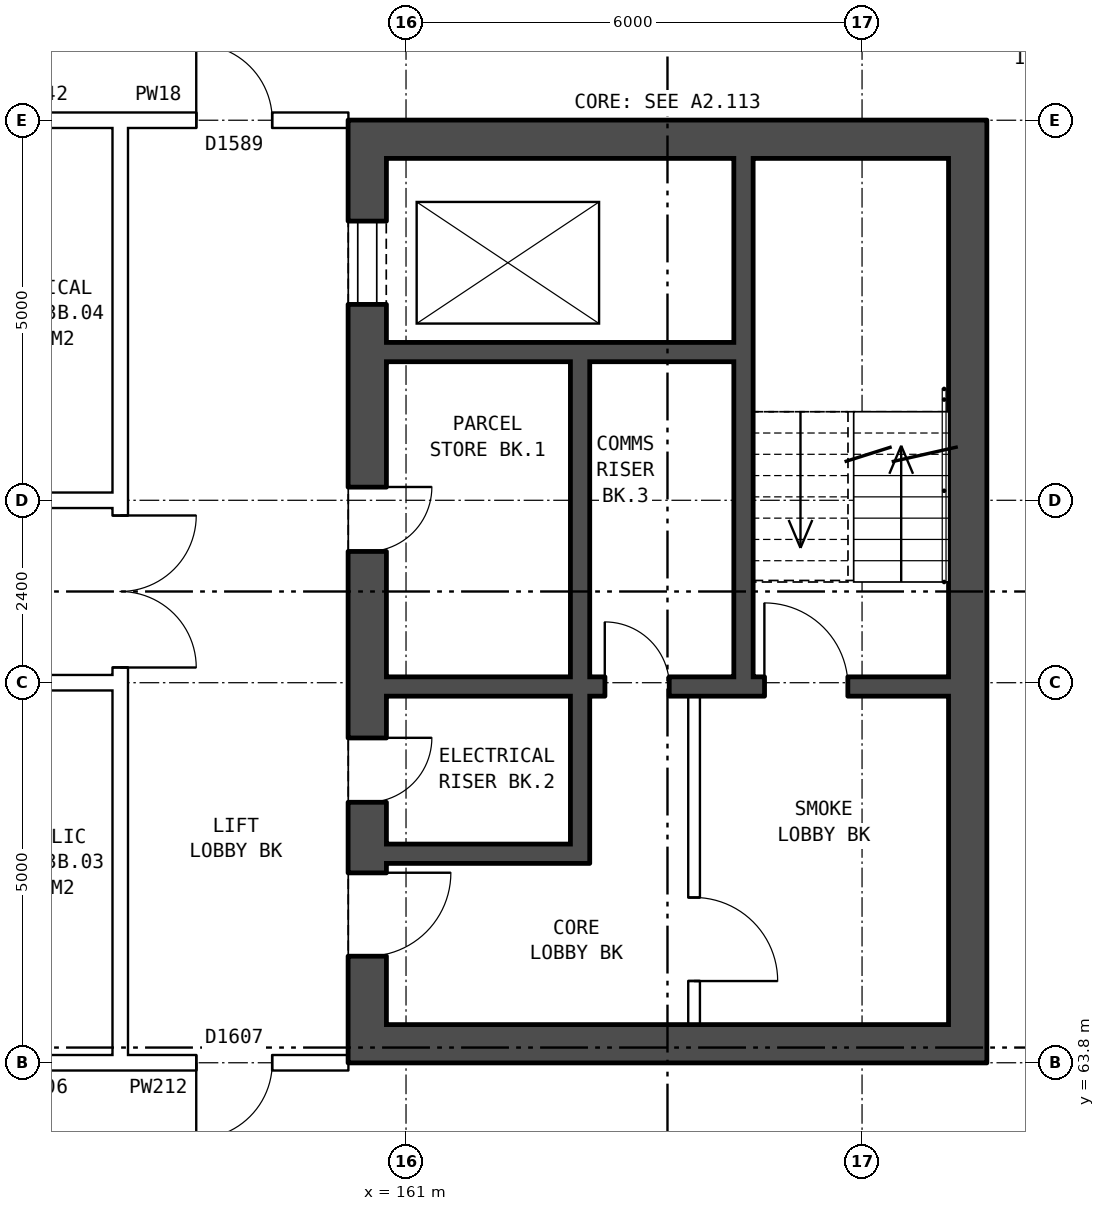
"""IFC4 building model, lengths in metres.
Left out: names, types, materials, properties, quantities, classifications, styles, units other than length and angle.
Written with IfcOpenShell. Run it as: python <this file> out.ifc"""

import sys

from ifc_helpers import new_model, si_unit, direction, frame, frame_2d, origin, place, context, subcontext, project, spatial, rectangle, extrude, element, fill, save


model = new_model("IFC4")
c1 = context("Model", 3, precision=1e-05, world=origin(), true_north=direction((0.0, 1.0)))
c2 = subcontext(c1, "Body", "Model", "MODEL_VIEW")
j1 = project(units=[si_unit("LENGTHUNIT", "METRE"), si_unit("PLANEANGLEUNIT", "RADIAN")], contexts=[c1])
p1 = place(None, origin())
s1 = spatial("IfcSite", under=j1, at=p1, CompositionType="ELEMENT")
p2 = place(p1, origin())
s2 = spatial("IfcBuilding", under=s1, at=p2, CompositionType="ELEMENT")
p3 = place(p2, frame((0.0, 0.0, 154.7)))
s3 = spatial("IfcBuildingStorey", under=s2, at=p3, CompositionType="ELEMENT", Elevation=154.7)
p4 = place(p3, frame((160.49, 76.2, 0.0), z_axis=(0.0, 0.0, 1.0), x_axis=(0.0, -1.0, 0.0)))
e1 = element("IfcWall", 1, at=p4, inside=s3, PredefinedType="SHEAR", context=c2, shape_type="SweptSolid", body=[
    extrude(rectangle(XDim=12.4, YDim=0.5, at=frame_2d((6.2, 0.0))), origin(), (0.0, 0.0, 1.0), 2.85),
])
p5 = place(p4, frame((1.325, 0.0, 0.0)))
e2 = element("IfcOpeningElement", 2, at=p5, cuts=e1, PredefinedType="OPENING", context=c2, shape_type="SweptSolid", body=[
    extrude(rectangle(XDim=1.1, YDim=2.1, at=frame_2d((0.55, 1.05))), frame((0.0, 0.26, 0.0), z_axis=(0.0, -1.0, 0.0), x_axis=(1.0, 0.0, 0.0)), (0.0, 0.0, 1.0), 0.52),
])
p6 = place(p4, frame((4.825, 0.0, 0.0)))
e3 = element("IfcOpeningElement", 3, at=p6, cuts=e1, PredefinedType="OPENING", context=c2, shape_type="SweptSolid", body=[
    extrude(rectangle(XDim=0.85, YDim=2.1, at=frame_2d((0.425, 1.05))), frame((0.0, 0.26, 0.0), z_axis=(0.0, -1.0, 0.0), x_axis=(1.0, 0.0, 0.0)), (0.0, 0.0, 1.0), 0.52),
])
p7 = place(p4, frame((9.9, 0.0, 0.0)))
e4 = element("IfcOpeningElement", 4, at=p7, cuts=e1, PredefinedType="OPENING", context=c2, shape_type="SweptSolid", body=[
    extrude(rectangle(XDim=1.1, YDim=2.1, at=frame_2d((0.55, 1.05))), frame((0.0, 0.26, 0.0), z_axis=(0.0, -1.0, 0.0), x_axis=(1.0, 0.0, 0.0)), (0.0, 0.0, 1.0), 0.52),
])
p8 = place(p4, frame((8.125, 0.0, 0.0)))
e5 = element("IfcOpeningElement", 5, at=p8, cuts=e1, PredefinedType="OPENING", context=c2, shape_type="SweptSolid", body=[
    extrude(rectangle(XDim=0.85, YDim=2.1, at=frame_2d((0.425, 1.05))), frame((0.0, 0.26, 0.0), z_axis=(0.0, -1.0, 0.0), x_axis=(1.0, 0.0, 0.0)), (0.0, 0.0, 1.0), 0.52),
])
p9 = place(p3, frame((168.39, 76.2, 0.0), z_axis=(0.0, 0.0, 1.0), x_axis=(0.0, -1.0, 0.0)))
e6 = element("IfcWall", 6, at=p9, inside=s3, PredefinedType="SHEAR", context=c2, shape_type="SweptSolid", body=[
    extrude(rectangle(XDim=12.4, YDim=0.5, at=frame_2d((6.2, 0.0))), origin(), (0.0, 0.0, 1.0), 2.85),
])
for number, where, z_axis, x_axis in (
    (7, (160.74, 75.95, 0.0), (0.0, 0.0, 1.0), (1.0, 0.0, 0.0)),
    (8, (160.74, 64.05, 0.0), (0.0, 0.0, 1.0), (1.0, 0.0, 0.0)),
):
    element("IfcWall", number, at=place(p3, frame(where, z_axis=z_axis, x_axis=x_axis)), inside=s3, PredefinedType="SHEAR", context=c2, shape_type="SweptSolid", body=[
        extrude(rectangle(XDim=7.4, YDim=0.5, at=frame_2d((3.7, 0.0))), origin(), (0.0, 0.0, 1.0), 2.85),
    ])
p10 = place(p3, frame((160.74, 73.15, 0.0), z_axis=(0.0, 0.0, 1.0), x_axis=(1.0, 0.0, 0.0)))
e9 = element("IfcWall", 9, at=p10, inside=s3, PredefinedType="SHEAR", context=c2, shape_type="SweptSolid", body=[
    extrude(rectangle(XDim=4.575, YDim=0.25, at=frame_2d((2.288, 0.0))), origin(), (0.0, 0.0, 1.0), 2.85),
])
p11 = place(p3, frame((160.74, 68.75, 0.0), z_axis=(0.0, 0.0, 1.0), x_axis=(1.0, 0.0, 0.0)))
e10 = element("IfcWall", 10, at=p11, inside=s3, PredefinedType="SHEAR", context=c2, shape_type="SweptSolid", body=[
    extrude(rectangle(XDim=7.4, YDim=0.25, at=frame_2d((3.7, 0.0))), origin(), (0.0, 0.0, 1.0), 2.85),
])
p12 = place(p11, frame((4.975, 0.0, 0.0)))
e11 = element("IfcOpeningElement", 11, at=p12, cuts=e10, PredefinedType="OPENING", context=c2, shape_type="SweptSolid", body=[
    extrude(rectangle(XDim=1.1, YDim=2.1, at=frame_2d((0.55, 1.05))), frame((0.0, 0.135, 0.0), z_axis=(0.0, -1.0, 0.0), x_axis=(1.0, 0.0, 0.0)), (0.0, 0.0, 1.0), 0.27),
])
p13 = place(p11, frame((2.875, 0.0, 0.0)))
e12 = element("IfcOpeningElement", 12, at=p13, cuts=e10, PredefinedType="OPENING", context=c2, shape_type="SweptSolid", body=[
    extrude(rectangle(XDim=0.85, YDim=2.1, at=frame_2d((0.425, 1.05))), frame((0.0, 0.135, 0.0), z_axis=(0.0, -1.0, 0.0), x_axis=(1.0, 0.0, 0.0)), (0.0, 0.0, 1.0), 0.27),
])
p14 = place(p3, frame((160.74, 66.55, 0.0), z_axis=(0.0, 0.0, 1.0), x_axis=(1.0, 0.0, 0.0)))
e13 = element("IfcWall", 13, at=p14, inside=s3, PredefinedType="SHEAR", context=c2, shape_type="SweptSolid", body=[
    extrude(rectangle(XDim=2.425, YDim=0.25, at=frame_2d((1.212, 0.0))), origin(), (0.0, 0.0, 1.0), 2.85),
])
p15 = place(p3, frame((163.29, 73.025, 0.0), z_axis=(0.0, 0.0, 1.0), x_axis=(0.0, -1.0, 0.0)))
e14 = element("IfcWall", 14, at=p15, inside=s3, PredefinedType="SHEAR", context=c2, shape_type="SweptSolid", body=[
    extrude(rectangle(XDim=4.15, YDim=0.25, at=frame_2d((2.075, 0.0))), origin(), (0.0, 0.0, 1.0), 2.85),
])
p16 = place(p3, frame((163.29, 68.625, 0.0), z_axis=(0.0, 0.0, 1.0), x_axis=(0.0, -1.0, 0.0)))
e15 = element("IfcWall", 15, at=p16, inside=s3, PredefinedType="SHEAR", context=c2, shape_type="SweptSolid", body=[
    extrude(rectangle(XDim=2.2, YDim=0.25, at=frame_2d((1.1, 0.0))), origin(), (0.0, 0.0, 1.0), 2.85),
])
p17 = place(p3, frame((164.79, 68.625, 0.0), z_axis=(0.0, 0.0, 1.0), x_axis=(0.0, -1.0, 0.0)))
e16 = element("IfcWall", 16, at=p17, inside=s3, PredefinedType="PARTITIONING", context=c2, shape_type="SweptSolid", body=[
    extrude(rectangle(XDim=4.325, YDim=0.15, at=frame_2d((2.163, 0.0))), origin(), (0.0, 0.0, 1.0), 2.85),
])
p18 = place(p17, frame((2.65, 0.0, 0.0)))
e17 = element("IfcOpeningElement", 17, at=p18, cuts=e16, PredefinedType="OPENING", context=c2, shape_type="SweptSolid", body=[
    extrude(rectangle(XDim=1.1, YDim=2.1, at=frame_2d((0.55, 1.05))), frame((0.0, 0.085, 0.0), z_axis=(0.0, -1.0, 0.0), x_axis=(1.0, 0.0, 0.0)), (0.0, 0.0, 1.0), 0.17),
])
p19 = place(p3, frame((165.44, 75.7, 0.0), z_axis=(0.0, 0.0, 1.0), x_axis=(0.0, -1.0, 0.0)))
e18 = element("IfcWall", 18, at=p19, inside=s3, PredefinedType="SHEAR", context=c2, shape_type="SweptSolid", body=[
    extrude(rectangle(XDim=6.825, YDim=0.25, at=frame_2d((3.413, 0.0))), origin(), (0.0, 0.0, 1.0), 2.85),
])
p20 = place(p3, frame((157.24, 63.9, 0.0), z_axis=(0.0, 0.0, 1.0), x_axis=(0.0, 1.0, 0.0)))
e19 = element("IfcWall", 19, at=p20, inside=s3, PredefinedType="PARTITIONING", context=c2, shape_type="SweptSolid", body=[
    extrude(rectangle(XDim=12.2, YDim=0.2, at=frame_2d((6.1, 0.0))), origin(), (0.0, 0.0, 1.0), 2.85),
])
p21 = place(p20, frame((5.1, 0.0, 0.0)))
e20 = element("IfcOpeningElement", 20, at=p21, cuts=e19, PredefinedType="OPENING", context=c2, shape_type="SweptSolid", body=[
    extrude(rectangle(XDim=2.0, YDim=2.1, at=frame_2d((1.0, 1.05))), frame((0.0, 0.11, 0.0), z_axis=(0.0, -1.0, 0.0), x_axis=(1.0, 0.0, 0.0)), (0.0, 0.0, 1.0), 0.22),
])
p22 = place(p3, frame((155.1, 63.8, 0.0), z_axis=(0.0, 0.0, 1.0), x_axis=(1.0, 0.0, 0.0)))
e21 = element("IfcWall", 21, at=p22, inside=s3, PredefinedType="PARTITIONING", context=c2, shape_type="SweptSolid", body=[
    extrude(rectangle(XDim=2.14, YDim=0.2, at=frame_2d((1.07, 0.0))), origin(), (0.0, 0.0, 1.0), 2.85),
])
p23 = place(p3, frame((157.24, 63.8, 0.0), z_axis=(0.0, 0.0, 1.0), x_axis=(1.0, 0.0, 0.0)))
e22 = element("IfcWall", 22, at=p23, inside=s3, PredefinedType="PARTITIONING", context=c2, shape_type="SweptSolid", body=[
    extrude(rectangle(XDim=3.0, YDim=0.2, at=frame_2d((1.5, 0.0))), origin(), (0.0, 0.0, 1.0), 2.85),
])
p24 = place(p23, frame((1.0, 0.0, 0.0)))
e23 = element("IfcOpeningElement", 23, at=p24, cuts=e22, PredefinedType="OPENING", context=c2, shape_type="SweptSolid", body=[
    extrude(rectangle(XDim=1.0, YDim=2.1, at=frame_2d((0.5, 1.05))), frame((0.0, 0.11, 0.0), z_axis=(0.0, -1.0, 0.0), x_axis=(1.0, 0.0, 0.0)), (0.0, 0.0, 1.0), 0.22),
])
p25 = place(p3, frame((142.76, 68.8, 0.0), z_axis=(0.0, 0.0, 1.0), x_axis=(1.0, 0.0, 0.0)))
e24 = element("IfcWall", 24, at=p25, inside=s3, PredefinedType="PARTITIONING", context=c2, shape_type="SweptSolid", body=[
    extrude(rectangle(XDim=14.48, YDim=0.2, at=frame_2d((7.24, 0.0))), origin(), (0.0, 0.0, 1.0), 2.85),
])
p26 = place(p25, frame((1.12, 0.0, 0.0)))
e25 = element("IfcOpeningElement", 25, at=p26, cuts=e24, PredefinedType="OPENING", context=c2, shape_type="SweptSolid", body=[
    extrude(rectangle(XDim=1.0, YDim=2.1, at=frame_2d((0.5, 1.05))), frame((0.0, 0.11, 0.0), z_axis=(0.0, -1.0, 0.0), x_axis=(1.0, 0.0, 0.0)), (0.0, 0.0, 1.0), 0.22),
])
p27 = place(p25, frame((7.24, 0.0, 0.0)))
e26 = element("IfcOpeningElement", 26, at=p27, cuts=e24, PredefinedType="OPENING", context=c2, shape_type="SweptSolid", body=[
    extrude(rectangle(XDim=1.0, YDim=2.1, at=frame_2d((0.5, 1.05))), frame((0.0, 0.11, 0.0), z_axis=(0.0, -1.0, 0.0), x_axis=(1.0, 0.0, 0.0)), (0.0, 0.0, 1.0), 0.22),
])
p28 = place(p3, frame((142.76, 71.2, 0.0), z_axis=(0.0, 0.0, 1.0), x_axis=(1.0, 0.0, 0.0)))
e27 = element("IfcWall", 27, at=p28, inside=s3, PredefinedType="PARTITIONING", context=c2, shape_type="SweptSolid", body=[
    extrude(rectangle(XDim=14.48, YDim=0.2, at=frame_2d((7.24, 0.0))), origin(), (0.0, 0.0, 1.0), 2.85),
])
p29 = place(p28, frame((4.24, 0.0, 0.0)))
e28 = element("IfcOpeningElement", 28, at=p29, cuts=e27, PredefinedType="OPENING", context=c2, shape_type="SweptSolid", body=[
    extrude(rectangle(XDim=1.0, YDim=2.1, at=frame_2d((0.5, 1.05))), frame((0.0, 0.11, 0.0), z_axis=(0.0, -1.0, 0.0), x_axis=(1.0, 0.0, 0.0)), (0.0, 0.0, 1.0), 0.22),
])
p30 = place(p28, frame((10.24, 0.0, 0.0)))
e29 = element("IfcOpeningElement", 29, at=p30, cuts=e27, PredefinedType="OPENING", context=c2, shape_type="SweptSolid", body=[
    extrude(rectangle(XDim=1.0, YDim=2.1, at=frame_2d((0.5, 1.05))), frame((0.0, 0.11, 0.0), z_axis=(0.0, -1.0, 0.0), x_axis=(1.0, 0.0, 0.0)), (0.0, 0.0, 1.0), 0.22),
])
p31 = place(p3, frame((155.1, 76.2, 0.0), z_axis=(0.0, 0.0, 1.0), x_axis=(1.0, 0.0, 0.0)))
e30 = element("IfcWall", 30, at=p31, inside=s3, PredefinedType="PARTITIONING", context=c2, shape_type="SweptSolid", body=[
    extrude(rectangle(XDim=2.14, YDim=0.2, at=frame_2d((1.07, 0.0))), origin(), (0.0, 0.0, 1.0), 2.85),
])
p32 = place(p3, frame((157.24, 76.2, 0.0), z_axis=(0.0, 0.0, 1.0), x_axis=(1.0, 0.0, 0.0)))
e31 = element("IfcWall", 31, at=p32, inside=s3, PredefinedType="PARTITIONING", context=c2, shape_type="SweptSolid", body=[
    extrude(rectangle(XDim=3.0, YDim=0.2, at=frame_2d((1.5, 0.0))), origin(), (0.0, 0.0, 1.0), 2.85),
])
p33 = place(p32, frame((1.0, 0.0, 0.0)))
e32 = element("IfcOpeningElement", 32, at=p33, cuts=e31, PredefinedType="OPENING", context=c2, shape_type="SweptSolid", body=[
    extrude(rectangle(XDim=1.0, YDim=2.1, at=frame_2d((0.5, 1.05))), frame((0.0, 0.11, 0.0), z_axis=(0.0, -1.0, 0.0), x_axis=(1.0, 0.0, 0.0)), (0.0, 0.0, 1.0), 0.22),
])
p34 = place(p5, origin())
e33 = element("IfcDoor", 33, at=p34, inside=s3, OperationType="DOUBLE_DOOR_SLIDING", PredefinedType="DOOR", context=c2, shape_type="SweptSolid", body=[
    extrude(rectangle(XDim=1.1, YDim=2.1, at=frame_2d((0.55, 1.05))), frame((0.0, 0.235, 0.0), z_axis=(0.0, -1.0, 0.0), x_axis=(1.0, 0.0, 0.0)), (0.0, 0.0, 1.0), 0.05),
])
fill(e2, e33)
p35 = place(p6, origin())
e34 = element("IfcDoor", 34, at=p35, inside=s3, OperationType="SINGLE_SWING_LEFT", PredefinedType="DOOR", context=c2, shape_type="SweptSolid", body=[
    extrude(rectangle(XDim=0.85, YDim=2.1, at=frame_2d((0.425, 1.05))), frame((0.0, 0.235, 0.0), z_axis=(0.0, -1.0, 0.0), x_axis=(1.0, 0.0, 0.0)), (0.0, 0.0, 1.0), 0.05),
])
fill(e3, e34)
p36 = place(p7, origin())
e35 = element("IfcDoor", 35, at=p36, inside=s3, OperationType="SINGLE_SWING_LEFT", PredefinedType="DOOR", context=c2, shape_type="SweptSolid", body=[
    extrude(rectangle(XDim=1.1, YDim=2.1, at=frame_2d((0.55, 1.05))), frame((0.0, 0.235, 0.0), z_axis=(0.0, -1.0, 0.0), x_axis=(1.0, 0.0, 0.0)), (0.0, 0.0, 1.0), 0.05),
])
fill(e4, e35)
p37 = place(p18, origin())
e36 = element("IfcDoor", 36, at=p37, inside=s3, OperationType="SINGLE_SWING_RIGHT", PredefinedType="DOOR", context=c2, shape_type="SweptSolid", body=[
    extrude(rectangle(XDim=1.1, YDim=2.1, at=frame_2d((0.55, 1.05))), frame((0.0, 0.025, 0.0), z_axis=(0.0, -1.0, 0.0), x_axis=(1.0, 0.0, 0.0)), (0.0, 0.0, 1.0), 0.05),
])
fill(e17, e36)
p38 = place(p12, origin())
e37 = element("IfcDoor", 37, at=p38, inside=s3, OperationType="SINGLE_SWING_LEFT", PredefinedType="DOOR", context=c2, shape_type="SweptSolid", body=[
    extrude(rectangle(XDim=1.1, YDim=2.1, at=frame_2d((0.55, 1.05))), frame((0.0, 0.025, 0.0), z_axis=(0.0, -1.0, 0.0), x_axis=(1.0, 0.0, 0.0)), (0.0, 0.0, 1.0), 0.05),
])
fill(e11, e37)
p39 = place(p8, origin())
e38 = element("IfcDoor", 38, at=p39, inside=s3, OperationType="SINGLE_SWING_LEFT", PredefinedType="DOOR", context=c2, shape_type="SweptSolid", body=[
    extrude(rectangle(XDim=0.85, YDim=2.1, at=frame_2d((0.425, 1.05))), frame((0.0, 0.235, 0.0), z_axis=(0.0, -1.0, 0.0), x_axis=(1.0, 0.0, 0.0)), (0.0, 0.0, 1.0), 0.05),
])
fill(e5, e38)
p40 = place(p13, origin())
e39 = element("IfcDoor", 39, at=p40, inside=s3, OperationType="SINGLE_SWING_LEFT", PredefinedType="DOOR", context=c2, shape_type="SweptSolid", body=[
    extrude(rectangle(XDim=0.85, YDim=2.1, at=frame_2d((0.425, 1.05))), frame((0.0, 0.025, 0.0), z_axis=(0.0, -1.0, 0.0), x_axis=(1.0, 0.0, 0.0)), (0.0, 0.0, 1.0), 0.05),
])
fill(e12, e39)
p41 = place(p21, frame((2.0, 0.0, 0.0), z_axis=(0.0, 0.0, 1.0), x_axis=(-1.0, 0.0, 0.0)))
e40 = element("IfcDoor", 40, at=p41, inside=s3, OperationType="DOUBLE_DOOR_SINGLE_SWING", PredefinedType="DOOR", context=c2, shape_type="SweptSolid", body=[
    extrude(rectangle(XDim=2.0, YDim=2.1, at=frame_2d((1.0, 1.05))), frame((0.0, 0.025, 0.0), z_axis=(0.0, -1.0, 0.0), x_axis=(1.0, 0.0, 0.0)), (0.0, 0.0, 1.0), 0.05),
])
fill(e20, e40)
p42 = place(p24, frame((1.0, 0.0, 0.0), z_axis=(0.0, 0.0, 1.0), x_axis=(-1.0, 0.0, 0.0)))
e41 = element("IfcDoor", 41, at=p42, inside=s3, OperationType="SINGLE_SWING_RIGHT", PredefinedType="DOOR", context=c2, shape_type="SweptSolid", body=[
    extrude(rectangle(XDim=1.0, YDim=2.1, at=frame_2d((0.5, 1.05))), frame((0.0, 0.025, 0.0), z_axis=(0.0, -1.0, 0.0), x_axis=(1.0, 0.0, 0.0)), (0.0, 0.0, 1.0), 0.05),
])
fill(e23, e41)
p43 = place(p33, origin())
e42 = element("IfcDoor", 42, at=p43, inside=s3, OperationType="SINGLE_SWING_LEFT", PredefinedType="DOOR", context=c2, shape_type="SweptSolid", body=[
    extrude(rectangle(XDim=1.0, YDim=2.1, at=frame_2d((0.5, 1.05))), frame((0.0, 0.025, 0.0), z_axis=(0.0, -1.0, 0.0), x_axis=(1.0, 0.0, 0.0)), (0.0, 0.0, 1.0), 0.05),
])
fill(e32, e42)
save(model, sys.argv[1])
